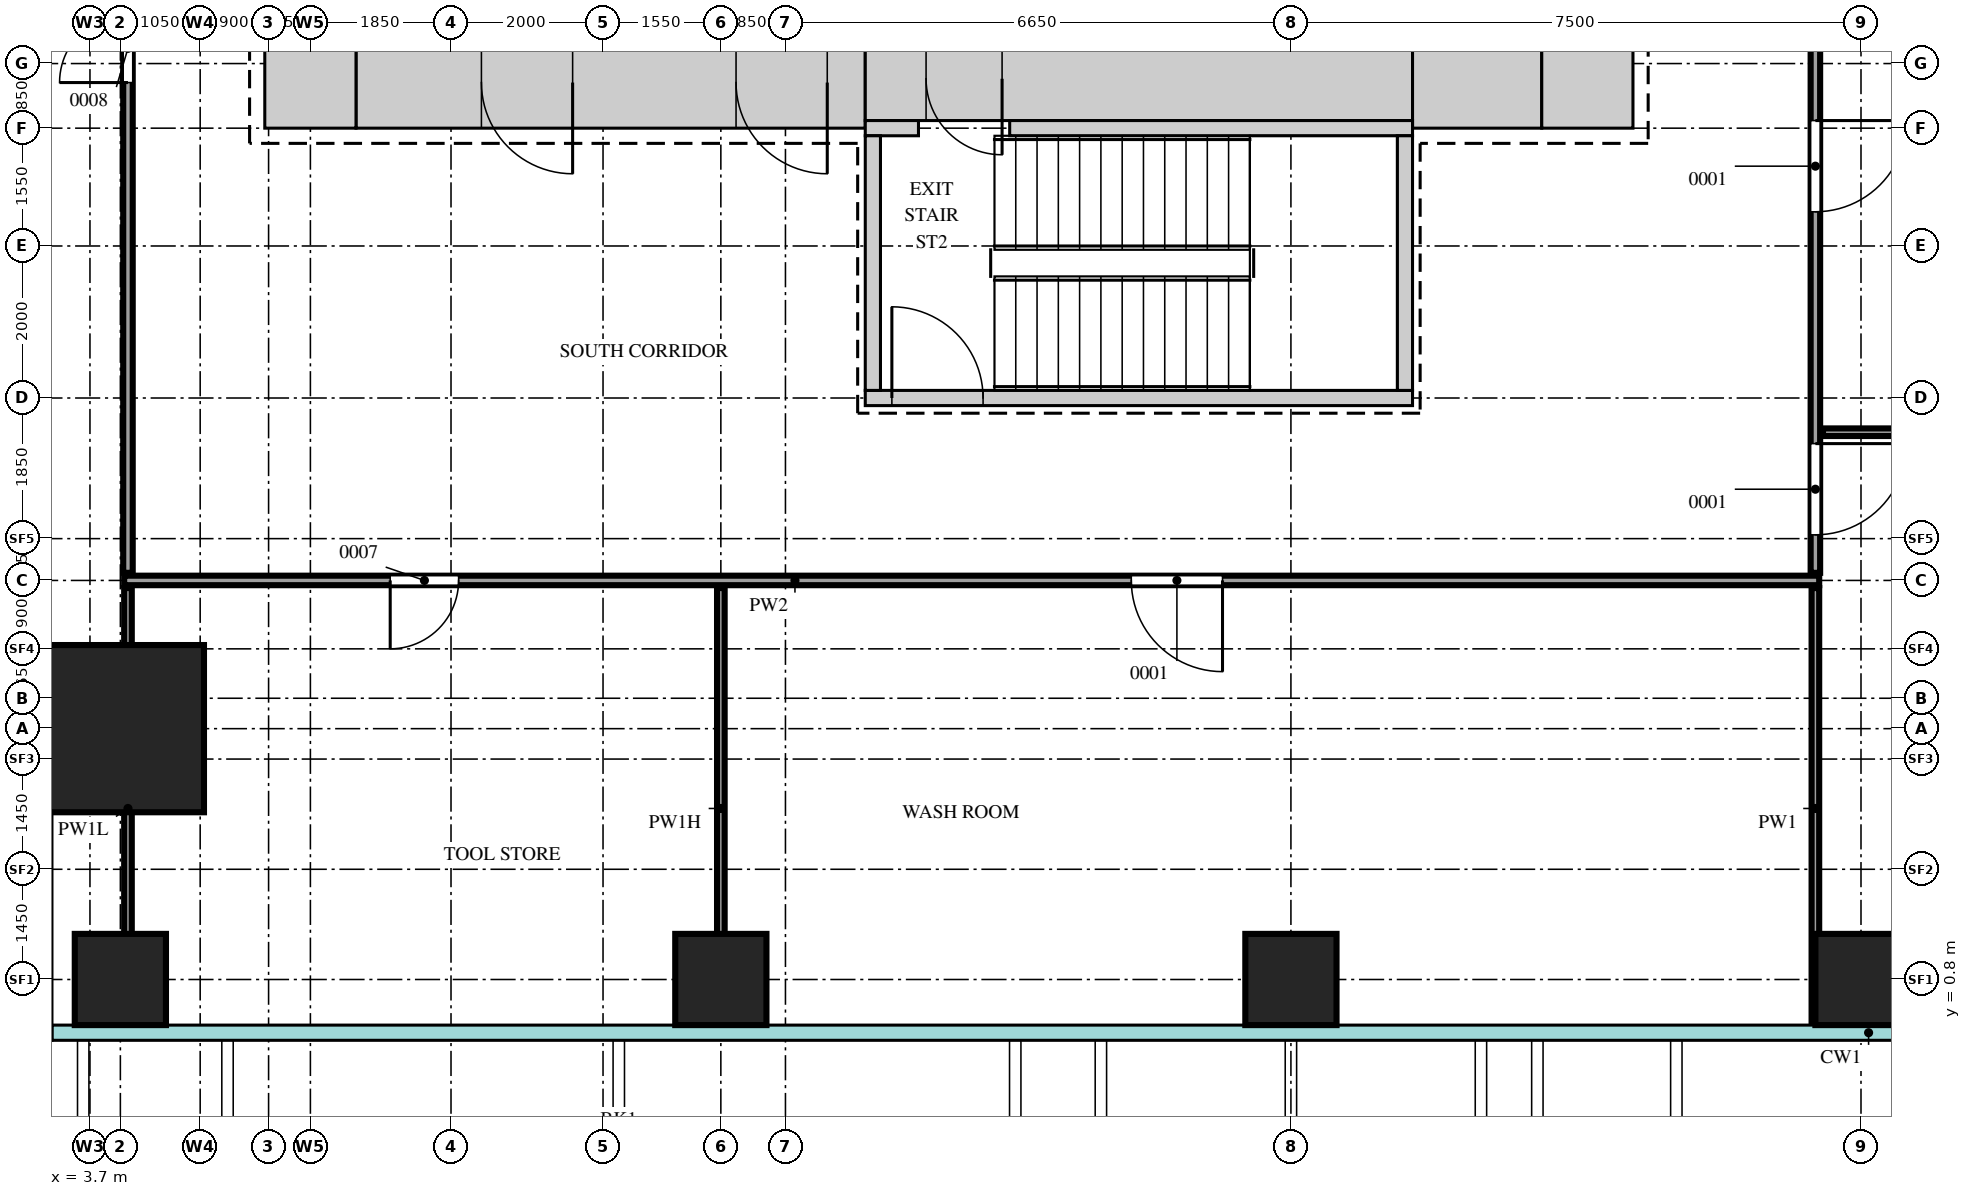
"""IFC4 building model, lengths in metres.
Left out: names, types, materials, properties, quantities, classifications, styles, units other than length and angle.
Written with IfcOpenShell. Run it as: python <this file> out.ifc"""

import sys

from ifc_helpers import new_model, si_unit, direction, frame, frame_2d, origin, origin_2d, place, context, subcontext, project, spatial, rectangle, extrude, source, transform, mapped, element, fill, save


model = new_model("IFC4")
c1 = context("Model", 3, precision=1e-05, world=origin(), true_north=direction((0.0, 1.0)))
c2 = subcontext(c1, "Body", "Model", "MODEL_VIEW")
j1 = project(units=[si_unit("LENGTHUNIT", "METRE"), si_unit("PLANEANGLEUNIT", "RADIAN")], contexts=[c1])
p1 = place(None, origin())
s1 = spatial("IfcSite", under=j1, at=p1, CompositionType="ELEMENT")
p2 = place(p1, origin())
s2 = spatial("IfcBuilding", under=s1, at=p2, CompositionType="ELEMENT")
p3 = place(p2, frame((0.0, 0.0, 60.0)))
s3 = spatial("IfcBuildingStorey", under=s2, at=p3, CompositionType="ELEMENT", Elevation=60.0)
m1 = source(origin(), c2, "Body", "SweptSolid", [
    extrude(rectangle(XDim=6.7, YDim=1.2, at=frame_2d((3.35, 0.0))), origin(), (0.0, 0.0, 1.0), 4.2),
])
p4 = place(p3, frame((7.2, 12.6, 0.0), z_axis=(0.0, 0.0, 1.0), x_axis=(1.0, 0.0, 0.0)))
e1 = element("IfcWall", 1, at=p4, inside=s3, PredefinedType="SHEAR", context=c2, shape_type="MappedRepresentation", body=[
    mapped(m1, transform((0.0, 0.0, 0.0))),
])
m2 = source(origin(), c2, "Body", "SweptSolid", [
    extrude(rectangle(XDim=1.2, YDim=2.1, at=frame_2d((0.6, 1.05))), frame((0.0, 0.61, 0.0), z_axis=(0.0, -1.0, 0.0), x_axis=(1.0, 0.0, 0.0)), (0.0, 0.0, 1.0), 1.22),
])
p5 = place(p4, frame((5.0, 0.0, 0.0)))
e2 = element("IfcOpeningElement", 2, at=p5, cuts=e1, PredefinedType="OPENING", context=c2, shape_type="MappedRepresentation", body=[
    mapped(m2, transform((0.0, 0.0, 0.0))),
])
p6 = place(p4, frame((1.65, 0.0, 0.0)))
e3 = element("IfcOpeningElement", 3, at=p6, cuts=e1, PredefinedType="OPENING", context=c2, shape_type="MappedRepresentation", body=[
    mapped(m2, transform((0.0, 0.0, 0.0))),
])
m3 = source(origin(), c2, "Body", "SweptSolid", [
    extrude(rectangle(XDim=7.2, YDim=1.1, at=frame_2d((3.6, 0.0))), origin(), (0.0, 0.0, 1.0), 4.2),
])
p7 = place(p3, frame((13.9, 12.65, 0.0), z_axis=(0.0, 0.0, 1.0), x_axis=(1.0, 0.0, 0.0)))
e4 = element("IfcWall", 4, at=p7, inside=s3, PredefinedType="SHEAR", context=c2, shape_type="MappedRepresentation", body=[
    mapped(m3, transform((0.0, 0.0, 0.0))),
])
m4 = source(origin(), c2, "Body", "SweptSolid", [
    extrude(rectangle(XDim=1.0, YDim=2.1, at=frame_2d((0.5, 1.05))), frame((0.0, 0.56, 0.0), z_axis=(0.0, -1.0, 0.0), x_axis=(1.0, 0.0, 0.0)), (0.0, 0.0, 1.0), 1.12),
])
p8 = place(p7, frame((0.8, 0.0, 0.0)))
e5 = element("IfcOpeningElement", 5, at=p8, cuts=e4, PredefinedType="OPENING", context=c2, shape_type="MappedRepresentation", body=[
    mapped(m4, transform((0.0, 0.0, 0.0))),
])
m5 = source(origin(), c2, "Body", "SweptSolid", [
    extrude(rectangle(XDim=1.7, YDim=1.2, at=frame_2d((0.85, 0.0))), origin(), (0.0, 0.0, 1.0), 4.2),
])
p9 = place(p3, frame((21.1, 12.6, 0.0), z_axis=(0.0, 0.0, 1.0), x_axis=(1.0, 0.0, 0.0)))
e6 = element("IfcWall", 6, at=p9, inside=s3, PredefinedType="SHEAR", context=c2, shape_type="MappedRepresentation", body=[
    mapped(m5, transform((0.0, 0.0, 0.0))),
])
m6 = source(origin(), c2, "Body", "SweptSolid", [
    extrude(rectangle(XDim=1.2, YDim=1.2, at=frame_2d((0.6, 0.0))), origin(), (0.0, 0.0, 1.0), 4.2),
])
for number, where, z_axis, x_axis in (
    (7, (22.8, 12.6, 0.0), (0.0, 0.0, 1.0), (1.0, 0.0, 0.0)),
    (8, (6.0, 12.6, 0.0), (0.0, 0.0, 1.0), (1.0, 0.0, 0.0)),
):
    element("IfcWall", number, at=place(p3, frame(where, z_axis=z_axis, x_axis=x_axis)), inside=s3, PredefinedType="SHEAR", context=c2, shape_type="MappedRepresentation", body=[
        mapped(m6, transform((0.0, 0.0, 0.0))),
    ])
m7 = source(origin(), c2, "Body", "SweptSolid", [
    extrude(rectangle(XDim=0.7, YDim=0.2, at=frame_2d((0.35, 0.0))), origin(), (0.0, 0.0, 1.0), 4.2),
])
p10 = place(p3, frame((13.9, 12.0, 0.0), z_axis=(0.0, 0.0, 1.0), x_axis=(1.0, 0.0, 0.0)))
e9 = element("IfcWall", 9, at=p10, inside=s3, PredefinedType="SHEAR", context=c2, shape_type="MappedRepresentation", body=[
    mapped(m7, transform((0.0, 0.0, 0.0))),
])
m8 = source(origin(), c2, "Body", "SweptSolid", [
    extrude(rectangle(XDim=5.3, YDim=0.2, at=frame_2d((2.65, 0.0))), origin(), (0.0, 0.0, 1.0), 4.2),
])
p11 = place(p3, frame((15.8, 12.0, 0.0), z_axis=(0.0, 0.0, 1.0), x_axis=(1.0, 0.0, 0.0)))
e10 = element("IfcWall", 10, at=p11, inside=s3, PredefinedType="SHEAR", context=c2, shape_type="MappedRepresentation", body=[
    mapped(m8, transform((0.0, 0.0, 0.0))),
])
m9 = source(origin(), c2, "Body", "SweptSolid", [
    extrude(rectangle(XDim=7.2, YDim=0.2, at=frame_2d((3.6, 0.0))), origin(), (0.0, 0.0, 1.0), 4.2),
])
p12 = place(p3, frame((13.9, 8.45, 0.0), z_axis=(0.0, 0.0, 1.0), x_axis=(1.0, 0.0, 0.0)))
e11 = element("IfcWall", 11, at=p12, inside=s3, PredefinedType="SHEAR", context=c2, shape_type="MappedRepresentation", body=[
    mapped(m9, transform((0.0, 0.0, 0.0))),
])
m10 = source(origin(), c2, "Body", "SweptSolid", [
    extrude(rectangle(XDim=1.2, YDim=2.1, at=frame_2d((0.6, 1.05))), frame((0.0, 0.11, 0.0), z_axis=(0.0, -1.0, 0.0), x_axis=(1.0, 0.0, 0.0)), (0.0, 0.0, 1.0), 0.22),
])
p13 = place(p12, frame((0.35, 0.0, 0.0)))
e12 = element("IfcOpeningElement", 12, at=p13, cuts=e11, PredefinedType="OPENING", context=c2, shape_type="MappedRepresentation", body=[
    mapped(m10, transform((0.0, 0.0, 0.0))),
])
m11 = source(origin(), c2, "Body", "SweptSolid", [
    extrude(rectangle(XDim=3.35, YDim=0.2, at=frame_2d((1.675, 0.0))), origin(), (0.0, 0.0, 1.0), 4.2),
])
for number, where, z_axis, x_axis in (
    (13, (21.0, 8.55, 0.0), (0.0, 0.0, 1.0), (0.0, 1.0, 0.0)),
    (14, (14.0, 8.55, 0.0), (0.0, 0.0, 1.0), (0.0, 1.0, 0.0)),
):
    element("IfcWall", number, at=place(p3, frame(where, z_axis=z_axis, x_axis=x_axis)), inside=s3, PredefinedType="SHEAR", context=c2, shape_type="MappedRepresentation", body=[
        mapped(m11, transform((0.0, 0.0, 0.0))),
    ])
m12 = source(origin(), c2, "Body", "SweptSolid", [
    extrude(rectangle(XDim=2.2, YDim=2.2, at=origin_2d()), origin(), (0.0, 0.0, 1.0), 4.5),
])
p14 = place(p3, frame((4.1, 4.1, 0.0), z_axis=(0.0, 0.0, 1.0), x_axis=(1.0, 0.0, 0.0)))
e15 = element("IfcColumn", 15, at=p14, inside=s3, PredefinedType="COLUMN", context=c2, shape_type="MappedRepresentation", body=[
    mapped(m12, transform((0.0, 0.0, 0.0))),
])
m13 = source(origin(), c2, "Body", "SweptSolid", [
    extrude(rectangle(XDim=1.2, YDim=1.2, at=origin_2d()), origin(), (0.0, 0.0, 1.0), 4.2),
])
for number, where, z_axis, x_axis in (
    (16, (4.1, 0.8, 0.0), (0.0, 0.0, 1.0), (1.0, 0.0, 0.0)),
    (17, (12.0, 0.8, 0.0), (0.0, 0.0, 1.0), (1.0, 0.0, 0.0)),
    (18, (19.5, 0.8, 0.0), (0.0, 0.0, 1.0), (1.0, 0.0, 0.0)),
    (19, (27.0, 0.8, 0.0), (0.0, 0.0, 1.0), (1.0, 0.0, 0.0)),
):
    element("IfcColumn", number, at=place(p3, frame(where, z_axis=z_axis, x_axis=x_axis)), inside=s3, PredefinedType="COLUMN", context=c2, shape_type="MappedRepresentation", body=[
        mapped(m13, transform((0.0, 0.0, 0.0))),
    ])
m14 = source(origin(), c2, "Body", "SweptSolid", [
    extrude(rectangle(XDim=5.8, YDim=0.1, at=frame_2d((2.9, 0.0))), origin(), (0.0, 0.0, 1.0), 3.6),
])
p15 = place(p3, frame((4.2, 0.15, 0.0), z_axis=(0.0, 0.0, 1.0), x_axis=(0.0, 1.0, 0.0)))
e20 = element("IfcWall", 20, at=p15, inside=s3, PredefinedType="PARTITIONING", context=c2, shape_type="MappedRepresentation", body=[
    mapped(m14, transform((0.0, 0.0, 0.0))),
])
m15 = source(origin(), c2, "Body", "SweptSolid", [
    extrude(rectangle(XDim=5.8, YDim=0.1, at=frame_2d((2.9, 0.0))), origin(), (0.0, 0.0, 1.0), 3.7),
])
p16 = place(p3, frame((12.0, 0.15, 0.0), z_axis=(0.0, 0.0, 1.0), x_axis=(0.0, 1.0, 0.0)))
e21 = element("IfcWall", 21, at=p16, inside=s3, PredefinedType="PARTITIONING", context=c2, shape_type="MappedRepresentation", body=[
    mapped(m15, transform((0.0, 0.0, 0.0))),
])
m16 = source(origin(), c2, "Body", "SweptSolid", [
    extrude(rectangle(XDim=5.8, YDim=0.1, at=frame_2d((2.9, 0.0))), origin(), (0.0, 0.0, 1.0), 4.3),
])
p17 = place(p3, frame((26.4, 0.15, 0.0), z_axis=(0.0, 0.0, 1.0), x_axis=(0.0, 1.0, 0.0)))
e22 = element("IfcWall", 22, at=p17, inside=s3, PredefinedType="PARTITIONING", context=c2, shape_type="MappedRepresentation", body=[
    mapped(m16, transform((0.0, 0.0, 0.0))),
])
m17 = source(origin(), c2, "Body", "SweptSolid", [
    extrude(rectangle(XDim=22.3, YDim=0.125, at=frame_2d((11.15, 0.0))), origin(), (0.0, 0.0, 1.0), 4.3),
])
p18 = place(p3, frame((4.15, 6.05, 0.0), z_axis=(0.0, 0.0, 1.0), x_axis=(1.0, 0.0, 0.0)))
e23 = element("IfcWall", 23, at=p18, inside=s3, PredefinedType="PARTITIONING", context=c2, shape_type="MappedRepresentation", body=[
    mapped(m17, transform((0.0, 0.0, 0.0))),
])
m18 = source(origin(), c2, "Body", "SweptSolid", [
    extrude(rectangle(XDim=0.9, YDim=2.1, at=frame_2d((0.45, 1.05))), frame((0.0, 0.073, 0.0), z_axis=(0.0, -1.0, 0.0), x_axis=(1.0, 0.0, 0.0)), (0.0, 0.0, 1.0), 0.145),
])
p19 = place(p18, frame((3.5, 0.0, 0.0)))
e24 = element("IfcOpeningElement", 24, at=p19, cuts=e23, PredefinedType="OPENING", context=c2, shape_type="MappedRepresentation", body=[
    mapped(m18, transform((0.0, 0.0, 0.0))),
])
m19 = source(origin(), c2, "Body", "SweptSolid", [
    extrude(rectangle(XDim=1.2, YDim=2.1, at=frame_2d((0.6, 1.05))), frame((0.0, 0.073, 0.0), z_axis=(0.0, -1.0, 0.0), x_axis=(1.0, 0.0, 0.0)), (0.0, 0.0, 1.0), 0.145),
])
p20 = place(p18, frame((13.25, 0.0, 0.0)))
e25 = element("IfcOpeningElement", 25, at=p20, cuts=e23, PredefinedType="OPENING", context=c2, shape_type="MappedRepresentation", body=[
    mapped(m19, transform((0.0, 0.0, 0.0))),
])
m20 = source(origin(), c2, "Body", "SweptSolid", [
    extrude(rectangle(XDim=41.8, YDim=0.125, at=frame_2d((20.9, 0.0))), origin(), (0.0, 0.0, 1.0), 4.3),
])
p21 = place(p3, frame((4.2, 6.15, 0.0), z_axis=(0.0, 0.0, 1.0), x_axis=(0.0, 1.0, 0.0)))
e26 = element("IfcWall", 26, at=p21, inside=s3, PredefinedType="PARTITIONING", context=c2, shape_type="MappedRepresentation", body=[
    mapped(m20, transform((0.0, 0.0, 0.0))),
])
p22 = place(p21, frame((6.45, 0.0, 0.0)))
e27 = element("IfcOpeningElement", 27, at=p22, cuts=e26, PredefinedType="OPENING", context=c2, shape_type="MappedRepresentation", body=[
    mapped(m18, transform((0.0, 0.0, 0.0))),
])
p23 = place(p21, frame((25.05, 0.0, 0.0)))
e28 = element("IfcOpeningElement", 28, at=p23, cuts=e26, PredefinedType="OPENING", context=c2, shape_type="MappedRepresentation", body=[
    mapped(m19, transform((0.0, 0.0, 0.0))),
])
m21 = source(origin(), c2, "Body", "SweptSolid", [
    extrude(rectangle(XDim=29.05, YDim=0.125, at=frame_2d((14.525, 0.0))), origin(), (0.0, 0.0, 1.0), 4.3),
])
p24 = place(p3, frame((26.4, 6.15, 0.0), z_axis=(0.0, 0.0, 1.0), x_axis=(0.0, 1.0, 0.0)))
e29 = element("IfcWall", 29, at=p24, inside=s3, PredefinedType="PARTITIONING", context=c2, shape_type="MappedRepresentation", body=[
    mapped(m21, transform((0.0, 0.0, 0.0))),
])
p25 = place(p24, frame((0.5, 0.0, 0.0)))
e30 = element("IfcOpeningElement", 30, at=p25, cuts=e29, PredefinedType="OPENING", context=c2, shape_type="MappedRepresentation", body=[
    mapped(m19, transform((0.0, 0.0, 0.0))),
])
p26 = place(p24, frame((4.75, 0.0, 0.0)))
e31 = element("IfcOpeningElement", 31, at=p26, cuts=e29, PredefinedType="OPENING", context=c2, shape_type="MappedRepresentation", body=[
    mapped(m19, transform((0.0, 0.0, 0.0))),
])
p27 = place(p24, frame((11.25, 0.0, 0.0)))
e32 = element("IfcOpeningElement", 32, at=p27, cuts=e29, PredefinedType="OPENING", context=c2, shape_type="MappedRepresentation", body=[
    mapped(m19, transform((0.0, 0.0, 0.0))),
])
p28 = place(p24, frame((17.5, 0.0, 0.0)))
e33 = element("IfcOpeningElement", 33, at=p28, cuts=e29, PredefinedType="OPENING", context=c2, shape_type="MappedRepresentation", body=[
    mapped(m19, transform((0.0, 0.0, 0.0))),
])
m22 = source(origin(), c2, "Body", "SweptSolid", [
    extrude(rectangle(XDim=27.35, YDim=0.1, at=frame_2d((13.675, 0.0))), origin(), (0.0, 0.0, 1.0), 4.3),
])
p29 = place(p3, frame((26.5, 8.0, 0.0), z_axis=(0.0, 0.0, 1.0), x_axis=(1.0, 0.0, 0.0)))
e34 = element("IfcWall", 34, at=p29, inside=s3, PredefinedType="PARTITIONING", context=c2, shape_type="MappedRepresentation", body=[
    mapped(m22, transform((0.0, 0.0, 0.0))),
])
m23 = source(origin(), c2, "Body", "SweptSolid", [
    extrude(rectangle(XDim=1.2, YDim=2.1, at=frame_2d((0.6, 1.05))), frame((0.0, 0.55, 0.0), z_axis=(0.0, -1.0, 0.0), x_axis=(1.0, 0.0, 0.0)), (0.0, 0.0, 1.0), 1.1),
])
p30 = place(p5, origin())
e35 = element("IfcDoor", 35, at=p30, inside=s3, OperationType="SINGLE_SWING_RIGHT", PredefinedType="DOOR", context=c2, shape_type="MappedRepresentation", body=[
    mapped(m23, transform((0.0, 0.0, 0.0))),
])
fill(e2, e35)
p31 = place(p6, origin())
e36 = element("IfcDoor", 36, at=p31, inside=s3, OperationType="SINGLE_SWING_RIGHT", PredefinedType="DOOR", context=c2, shape_type="MappedRepresentation", body=[
    mapped(m23, transform((0.0, 0.0, 0.0))),
])
fill(e3, e36)
m24 = source(origin(), c2, "Body", "SweptSolid", [
    extrude(rectangle(XDim=1.0, YDim=2.1, at=frame_2d((0.5, 1.05))), frame((0.0, 0.5, 0.0), z_axis=(0.0, -1.0, 0.0), x_axis=(1.0, 0.0, 0.0)), (0.0, 0.0, 1.0), 1.0),
])
p32 = place(p8, origin())
e37 = element("IfcDoor", 37, at=p32, inside=s3, OperationType="SINGLE_SWING_RIGHT", PredefinedType="DOOR", context=c2, shape_type="MappedRepresentation", body=[
    mapped(m24, transform((0.0, 0.0, 0.0))),
])
fill(e5, e37)
m25 = source(origin(), c2, "Body", "SweptSolid", [
    extrude(rectangle(XDim=1.2, YDim=2.1, at=frame_2d((0.6, 1.05))), frame((0.0, 0.025, 0.0), z_axis=(0.0, -1.0, 0.0), x_axis=(1.0, 0.0, 0.0)), (0.0, 0.0, 1.0), 0.05),
])
p33 = place(p25, origin())
e38 = element("IfcDoor", 38, at=p33, inside=s3, OperationType="SINGLE_SWING_RIGHT", PredefinedType="DOOR", context=c2, shape_type="MappedRepresentation", body=[
    mapped(m25, transform((0.0, 0.0, 0.0))),
])
fill(e30, e38)
p34 = place(p26, origin())
e39 = element("IfcDoor", 39, at=p34, inside=s3, OperationType="SINGLE_SWING_RIGHT", PredefinedType="DOOR", context=c2, shape_type="MappedRepresentation", body=[
    mapped(m25, transform((0.0, 0.0, 0.0))),
])
fill(e31, e39)
m26 = source(origin(), c2, "Body", "SweptSolid", [
    extrude(rectangle(XDim=0.9, YDim=2.1, at=frame_2d((0.45, 1.05))), frame((0.0, 0.025, 0.0), z_axis=(0.0, -1.0, 0.0), x_axis=(1.0, 0.0, 0.0)), (0.0, 0.0, 1.0), 0.05),
])
p35 = place(p22, origin())
e40 = element("IfcDoor", 40, at=p35, inside=s3, OperationType="SINGLE_SWING_RIGHT", PredefinedType="DOOR", context=c2, shape_type="MappedRepresentation", body=[
    mapped(m26, transform((0.0, 0.0, 0.0))),
])
fill(e27, e40)
p36 = place(p19, origin())
e41 = element("IfcDoor", 41, at=p36, inside=s3, OperationType="SINGLE_SWING_LEFT", PredefinedType="DOOR", context=c2, shape_type="MappedRepresentation", body=[
    mapped(m26, transform((0.0, 0.0, 0.0))),
])
fill(e24, e41)
p37 = place(p20, origin())
e42 = element("IfcDoor", 42, at=p37, inside=s3, OperationType="SINGLE_SWING_RIGHT", PredefinedType="DOOR", context=c2, shape_type="MappedRepresentation", body=[
    mapped(m25, transform((0.0, 0.0, 0.0))),
])
fill(e25, e42)
p38 = place(p13, origin())
e43 = element("IfcDoor", 43, at=p38, inside=s3, OperationType="SINGLE_SWING_RIGHT", PredefinedType="DOOR", context=c2, shape_type="MappedRepresentation", body=[
    mapped(m25, transform((0.0, 0.0, 0.0))),
])
fill(e12, e43)
save(model, sys.argv[1])
